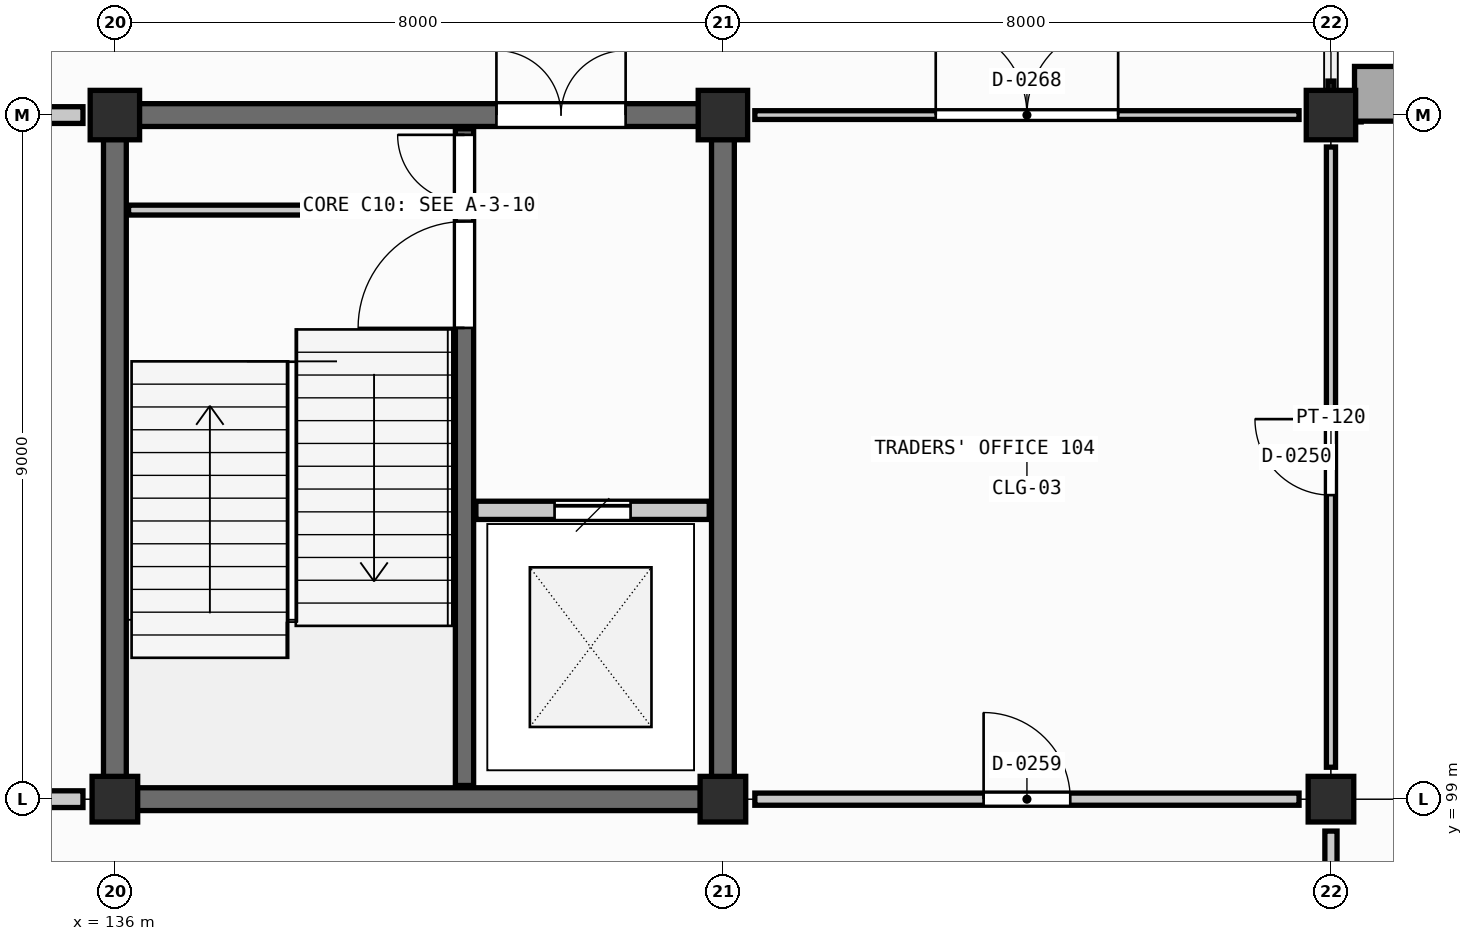
"""IFC4 building model, lengths in metres.
Left out: names, types, materials, properties, quantities, classifications, styles, units other than length and angle.
Written with IfcOpenShell. Run it as: python <this file> out.ifc"""

import sys

from ifc_helpers import new_model, si_unit, direction, frame, frame_2d, origin, origin_2d, place, context, subcontext, project, spatial, rectangle, extrude, element, fill, save


model = new_model("IFC4")
c1 = context("Model", 3, precision=1e-05, world=origin(), true_north=direction((0.0, 1.0)))
c2 = subcontext(c1, "Body", "Model", "MODEL_VIEW")
j1 = project(units=[si_unit("LENGTHUNIT", "METRE"), si_unit("PLANEANGLEUNIT", "RADIAN")], contexts=[c1])
p1 = place(None, origin())
s1 = spatial("IfcSite", under=j1, at=p1, CompositionType="ELEMENT")
p2 = place(p1, origin())
s2 = spatial("IfcBuilding", under=s1, at=p2, CompositionType="ELEMENT")
p3 = place(p2, frame((0.0, 0.0, 4.8)))
s3 = spatial("IfcBuildingStorey", under=s2, at=p3, CompositionType="ELEMENT", Elevation=4.8)
p4 = place(p3, frame((136.0, 99.0, 0.0), z_axis=(0.0, 0.0, 1.0), x_axis=(1.0, 0.0, 0.0)))
e1 = element("IfcColumn", 1, at=p4, inside=s3, PredefinedType="COLUMN", context=c2, shape_type="SweptSolid", body=[
    extrude(rectangle(XDim=0.6, YDim=0.6, at=origin_2d()), origin(), (0.0, 0.0, 1.0), 4.2),
])
p5 = place(p3, frame((136.0, 108.0, 0.0), z_axis=(0.0, 0.0, 1.0), x_axis=(1.0, 0.0, 0.0)))
e2 = element("IfcColumn", 2, at=p5, inside=s3, PredefinedType="COLUMN", context=c2, shape_type="SweptSolid", body=[
    extrude(rectangle(XDim=0.65, YDim=0.65, at=origin_2d()), origin(), (0.0, 0.0, 1.0), 4.2),
])
p6 = place(p3, frame((144.0, 99.0, 0.0), z_axis=(0.0, 0.0, 1.0), x_axis=(1.0, 0.0, 0.0)))
e3 = element("IfcColumn", 3, at=p6, inside=s3, PredefinedType="COLUMN", context=c2, shape_type="SweptSolid", body=[
    extrude(rectangle(XDim=0.6, YDim=0.6, at=origin_2d()), origin(), (0.0, 0.0, 1.0), 4.2),
])
p7 = place(p3, frame((144.0, 108.0, 0.0), z_axis=(0.0, 0.0, 1.0), x_axis=(1.0, 0.0, 0.0)))
e4 = element("IfcColumn", 4, at=p7, inside=s3, PredefinedType="COLUMN", context=c2, shape_type="SweptSolid", body=[
    extrude(rectangle(XDim=0.65, YDim=0.65, at=origin_2d()), origin(), (0.0, 0.0, 1.0), 4.2),
])
p8 = place(p3, frame((152.0, 99.0, 0.0), z_axis=(0.0, 0.0, 1.0), x_axis=(1.0, 0.0, 0.0)))
e5 = element("IfcColumn", 5, at=p8, inside=s3, PredefinedType="COLUMN", context=c2, shape_type="SweptSolid", body=[
    extrude(rectangle(XDim=0.6, YDim=0.6, at=origin_2d()), origin(), (0.0, 0.0, 1.0), 4.2),
])
p9 = place(p3, frame((152.0, 108.0, 0.0), z_axis=(0.0, 0.0, 1.0), x_axis=(1.0, 0.0, 0.0)))
e6 = element("IfcColumn", 6, at=p9, inside=s3, PredefinedType="COLUMN", context=c2, shape_type="SweptSolid", body=[
    extrude(rectangle(XDim=0.65, YDim=0.65, at=origin_2d()), origin(), (0.0, 0.0, 1.0), 4.2),
])
p10 = place(p3, frame((136.295, 99.0, 0.0), z_axis=(0.0, 0.0, 1.0), x_axis=(1.0, 0.0, 0.0)))
e7 = element("IfcWall", 7, at=p10, inside=s3, PredefinedType="SHEAR", context=c2, shape_type="SweptSolid", body=[
    extrude(rectangle(XDim=7.41, YDim=0.3, at=frame_2d((3.705, 0.0))), origin(), (0.0, 0.0, 1.0), 3.955),
])
p11 = place(p3, frame((136.32, 108.0, 0.0), z_axis=(0.0, 0.0, 1.0), x_axis=(1.0, 0.0, 0.0)))
e8 = element("IfcWall", 8, at=p11, inside=s3, PredefinedType="SHEAR", context=c2, shape_type="SweptSolid", body=[
    extrude(rectangle(XDim=7.36, YDim=0.3, at=frame_2d((3.68, 0.0))), origin(), (0.0, 0.0, 1.0), 3.955),
])
p12 = place(p11, frame((4.7, 0.0, 0.0)))
e9 = element("IfcOpeningElement", 9, at=p12, cuts=e8, PredefinedType="OPENING", context=c2, shape_type="SweptSolid", body=[
    extrude(rectangle(XDim=1.7, YDim=2.25, at=frame_2d((0.85, 1.125))), frame((0.0, 0.16, 0.0), z_axis=(0.0, -1.0, 0.0), x_axis=(1.0, 0.0, 0.0)), (0.0, 0.0, 1.0), 0.32),
])
for number, where, z_axis, x_axis in (
    (10, (136.0, 99.295, 0.0), (0.0, 0.0, 1.0), (0.0, 1.0, 0.0)),
    (11, (144.0, 99.295, 0.0), (0.0, 0.0, 1.0), (0.0, 1.0, 0.0)),
):
    element("IfcWall", number, at=place(p3, frame(where, z_axis=z_axis, x_axis=x_axis)), inside=s3, PredefinedType="SHEAR", context=c2, shape_type="SweptSolid", body=[
        extrude(rectangle(XDim=8.385, YDim=0.3, at=frame_2d((4.192, 0.0))), origin(), (0.0, 0.0, 1.0), 3.955),
    ])
p13 = place(p3, frame((140.6, 99.18, 0.0), z_axis=(0.0, 0.0, 1.0), x_axis=(0.0, 1.0, 0.0)))
e12 = element("IfcWall", 12, at=p13, inside=s3, PredefinedType="SHEAR", context=c2, shape_type="SweptSolid", body=[
    extrude(rectangle(XDim=8.64, YDim=0.24, at=frame_2d((4.32, 0.0))), origin(), (0.0, 0.0, 1.0), 3.955),
])
p14 = place(p13, frame((6.02, 0.0, 0.0)))
e13 = element("IfcOpeningElement", 13, at=p14, cuts=e12, PredefinedType="OPENING", context=c2, shape_type="SweptSolid", body=[
    extrude(rectangle(XDim=1.4, YDim=2.2, at=frame_2d((0.7, 1.1))), frame((0.0, 0.13, 0.0), z_axis=(0.0, -1.0, 0.0), x_axis=(1.0, 0.0, 0.0)), (0.0, 0.0, 1.0), 0.26),
])
p15 = place(p13, frame((7.68, 0.0, 0.0)))
e14 = element("IfcOpeningElement", 14, at=p15, cuts=e12, PredefinedType="OPENING", context=c2, shape_type="SweptSolid", body=[
    extrude(rectangle(XDim=0.88, YDim=2.02, at=frame_2d((0.44, 1.01))), frame((0.0, 0.13, 0.0), z_axis=(0.0, -1.0, 0.0), x_axis=(1.0, 0.0, 0.0)), (0.0, 0.0, 1.0), 0.26),
])
p16 = place(p3, frame((136.18, 106.75, 0.0), z_axis=(0.0, 0.0, 1.0), x_axis=(1.0, 0.0, 0.0)))
e15 = element("IfcWall", 15, at=p16, inside=s3, PredefinedType="PARTITIONING", context=c2, shape_type="SweptSolid", body=[
    extrude(rectangle(XDim=4.28, YDim=0.13, at=frame_2d((2.14, 0.0))), origin(), (0.0, 0.0, 1.0), 3.305),
])
p17 = place(p3, frame((140.75, 102.8, 0.0), z_axis=(0.0, 0.0, 1.0), x_axis=(1.0, 0.0, 0.0)))
e16 = element("IfcWall", 16, at=p17, inside=s3, PredefinedType="SHEAR", context=c2, shape_type="SweptSolid", body=[
    extrude(rectangle(XDim=3.07, YDim=0.24, at=frame_2d((1.535, 0.0))), origin(), (0.0, 0.0, 1.0), 3.305),
])
p18 = place(p17, frame((1.035, 0.0, 0.0)))
e17 = element("IfcOpeningElement", 17, at=p18, cuts=e16, PredefinedType="OPENING", context=c2, shape_type="SweptSolid", body=[
    extrude(rectangle(XDim=1.0, YDim=2.15, at=frame_2d((0.5, 1.075))), frame((0.0, 0.13, 0.0), z_axis=(0.0, -1.0, 0.0), x_axis=(1.0, 0.0, 0.0)), (0.0, 0.0, 1.0), 0.26),
])
p19 = place(p3, frame((152.0, 90.42, 0.0), z_axis=(0.0, 0.0, 1.0), x_axis=(0.0, 1.0, 0.0)))
e18 = element("IfcWall", 18, at=p19, inside=s3, PredefinedType="PARTITIONING", context=c2, shape_type="SweptSolid", body=[
    extrude(rectangle(XDim=8.16, YDim=0.16, at=frame_2d((4.08, 0.0))), origin(), (0.0, 0.0, 1.0), 3.05),
])
p20 = place(p19, frame((3.555, 0.0, 0.0)))
e19 = element("IfcOpeningElement", 19, at=p20, cuts=e18, PredefinedType="OPENING", context=c2, shape_type="SweptSolid", body=[
    extrude(rectangle(XDim=1.05, YDim=2.15, at=frame_2d((0.525, 1.075))), frame((0.0, 0.09, 0.0), z_axis=(0.0, -1.0, 0.0), x_axis=(1.0, 0.0, 0.0)), (0.0, 0.0, 1.0), 0.18),
])
p21 = place(p3, frame((152.0, 99.42, 0.0), z_axis=(0.0, 0.0, 1.0), x_axis=(0.0, 1.0, 0.0)))
e20 = element("IfcWall", 20, at=p21, inside=s3, PredefinedType="PARTITIONING", context=c2, shape_type="SweptSolid", body=[
    extrude(rectangle(XDim=8.16, YDim=0.12, at=frame_2d((4.08, 0.0))), origin(), (0.0, 0.0, 1.0), 3.05),
])
p22 = place(p21, frame((3.58, 0.0, 0.0)))
e21 = element("IfcOpeningElement", 21, at=p22, cuts=e20, PredefinedType="OPENING", context=c2, shape_type="SweptSolid", body=[
    extrude(rectangle(XDim=1.0, YDim=2.1, at=frame_2d((0.5, 1.05))), frame((0.0, 0.07, 0.0), z_axis=(0.0, -1.0, 0.0), x_axis=(1.0, 0.0, 0.0)), (0.0, 0.0, 1.0), 0.14),
])
p23 = place(p3, frame((128.82, 99.0, 0.0), z_axis=(0.0, 0.0, 1.0), x_axis=(1.0, 0.0, 0.0)))
e22 = element("IfcWall", 22, at=p23, inside=s3, PredefinedType="SOLIDWALL", context=c2, shape_type="SweptSolid", body=[
    extrude(rectangle(XDim=6.76, YDim=0.22, at=frame_2d((3.38, 0.0))), origin(), (0.0, 0.0, 1.0), 3.05),
])
p24 = place(p23, frame((2.58, 0.0, 0.0)))
e23 = element("IfcOpeningElement", 23, at=p24, cuts=e22, PredefinedType="OPENING", context=c2, shape_type="SweptSolid", body=[
    extrude(rectangle(XDim=1.6, YDim=2.28, at=frame_2d((0.8, 1.14))), frame((0.0, 0.12, 0.0), z_axis=(0.0, -1.0, 0.0), x_axis=(1.0, 0.0, 0.0)), (0.0, 0.0, 1.0), 0.24),
])
p25 = place(p3, frame((144.42, 99.0, 0.0), z_axis=(0.0, 0.0, 1.0), x_axis=(1.0, 0.0, 0.0)))
e24 = element("IfcWall", 24, at=p25, inside=s3, PredefinedType="PARTITIONING", context=c2, shape_type="SweptSolid", body=[
    extrude(rectangle(XDim=7.16, YDim=0.16, at=frame_2d((3.58, 0.0))), origin(), (0.0, 0.0, 1.0), 3.05),
])
p26 = place(p25, frame((3.01, 0.0, 0.0)))
e25 = element("IfcOpeningElement", 25, at=p26, cuts=e24, PredefinedType="OPENING", context=c2, shape_type="SweptSolid", body=[
    extrude(rectangle(XDim=1.14, YDim=2.19, at=frame_2d((0.57, 1.095))), frame((0.0, 0.09, 0.0), z_axis=(0.0, -1.0, 0.0), x_axis=(1.0, 0.0, 0.0)), (0.0, 0.0, 1.0), 0.18),
])
p27 = place(p3, frame((128.82, 108.0, 0.0), z_axis=(0.0, 0.0, 1.0), x_axis=(1.0, 0.0, 0.0)))
e26 = element("IfcWall", 26, at=p27, inside=s3, PredefinedType="SOLIDWALL", context=c2, shape_type="SweptSolid", body=[
    extrude(rectangle(XDim=6.76, YDim=0.22, at=frame_2d((3.38, 0.0))), origin(), (0.0, 0.0, 1.0), 3.05),
])
p28 = place(p27, frame((2.58, 0.0, 0.0)))
e27 = element("IfcOpeningElement", 27, at=p28, cuts=e26, PredefinedType="OPENING", context=c2, shape_type="SweptSolid", body=[
    extrude(rectangle(XDim=1.6, YDim=2.28, at=frame_2d((0.8, 1.14))), frame((0.0, 0.12, 0.0), z_axis=(0.0, -1.0, 0.0), x_axis=(1.0, 0.0, 0.0)), (0.0, 0.0, 1.0), 0.24),
])
p29 = place(p3, frame((144.42, 108.0, 0.0), z_axis=(0.0, 0.0, 1.0), x_axis=(1.0, 0.0, 0.0)))
e28 = element("IfcWall", 28, at=p29, inside=s3, PredefinedType="PARTITIONING", context=c2, shape_type="SweptSolid", body=[
    extrude(rectangle(XDim=7.16, YDim=0.115, at=frame_2d((3.58, 0.0))), origin(), (0.0, 0.0, 1.0), 3.05),
])
p30 = place(p29, frame((2.38, 0.0, 0.0)))
e29 = element("IfcOpeningElement", 29, at=p30, cuts=e28, PredefinedType="OPENING", context=c2, shape_type="SweptSolid", body=[
    extrude(rectangle(XDim=2.4, YDim=2.4, at=frame_2d((1.2, 1.2))), frame((0.0, 0.067, 0.0), z_axis=(0.0, -1.0, 0.0), x_axis=(1.0, 0.0, 0.0)), (0.0, 0.0, 1.0), 0.135),
])
p31 = place(p14, origin())
e30 = element("IfcDoor", 30, at=p31, inside=s3, OperationType="SINGLE_SWING_LEFT", PredefinedType="DOOR", context=c2, shape_type="SweptSolid", body=[
    extrude(rectangle(XDim=1.4, YDim=2.2, at=frame_2d((0.7, 1.1))), frame((0.0, 0.025, 0.0), z_axis=(0.0, -1.0, 0.0), x_axis=(1.0, 0.0, 0.0)), (0.0, 0.0, 1.0), 0.05),
])
fill(e13, e30)
p32 = place(p15, origin())
e31 = element("IfcDoor", 31, at=p32, inside=s3, OperationType="SINGLE_SWING_RIGHT", PredefinedType="DOOR", context=c2, shape_type="SweptSolid", body=[
    extrude(rectangle(XDim=0.88, YDim=2.02, at=frame_2d((0.44, 1.01))), frame((0.0, 0.025, 0.0), z_axis=(0.0, -1.0, 0.0), x_axis=(1.0, 0.0, 0.0)), (0.0, 0.0, 1.0), 0.05),
])
fill(e14, e31)
p33 = place(p12, origin())
e32 = element("IfcDoor", 32, at=p33, inside=s3, OperationType="DOUBLE_DOOR_SINGLE_SWING", PredefinedType="DOOR", context=c2, shape_type="SweptSolid", body=[
    extrude(rectangle(XDim=1.7, YDim=2.25, at=frame_2d((0.85, 1.125))), frame((0.0, 0.025, 0.0), z_axis=(0.0, -1.0, 0.0), x_axis=(1.0, 0.0, 0.0)), (0.0, 0.0, 1.0), 0.05),
])
fill(e9, e32)
p34 = place(p18, origin())
e33 = element("IfcDoor", 33, at=p34, inside=s3, OperationType="SLIDING_TO_LEFT", PredefinedType="DOOR", context=c2, shape_type="SweptSolid", body=[
    extrude(rectangle(XDim=1.0, YDim=2.15, at=frame_2d((0.5, 1.075))), frame((0.0, 0.025, 0.0), z_axis=(0.0, -1.0, 0.0), x_axis=(1.0, 0.0, 0.0)), (0.0, 0.0, 1.0), 0.05),
])
fill(e17, e33)
p35 = place(p22, origin())
e34 = element("IfcDoor", 34, at=p35, inside=s3, OperationType="SINGLE_SWING_RIGHT", PredefinedType="DOOR", context=c2, shape_type="SweptSolid", body=[
    extrude(rectangle(XDim=1.0, YDim=2.1, at=frame_2d((0.5, 1.05))), frame((0.0, 0.025, 0.0), z_axis=(0.0, -1.0, 0.0), x_axis=(1.0, 0.0, 0.0)), (0.0, 0.0, 1.0), 0.05),
])
fill(e21, e34)
p36 = place(p26, origin())
e35 = element("IfcDoor", 35, at=p36, inside=s3, OperationType="SINGLE_SWING_LEFT", PredefinedType="DOOR", context=c2, shape_type="SweptSolid", body=[
    extrude(rectangle(XDim=1.14, YDim=2.19, at=frame_2d((0.57, 1.095))), frame((0.0, 0.025, 0.0), z_axis=(0.0, -1.0, 0.0), x_axis=(1.0, 0.0, 0.0)), (0.0, 0.0, 1.0), 0.05),
])
fill(e25, e35)
p37 = place(p30, origin())
e36 = element("IfcDoor", 36, at=p37, inside=s3, OperationType="DOUBLE_DOOR_SINGLE_SWING", PredefinedType="DOOR", context=c2, shape_type="SweptSolid", body=[
    extrude(rectangle(XDim=2.4, YDim=2.4, at=frame_2d((1.2, 1.2))), frame((0.0, 0.025, 0.0), z_axis=(0.0, -1.0, 0.0), x_axis=(1.0, 0.0, 0.0)), (0.0, 0.0, 1.0), 0.05),
])
fill(e29, e36)
save(model, sys.argv[1])
